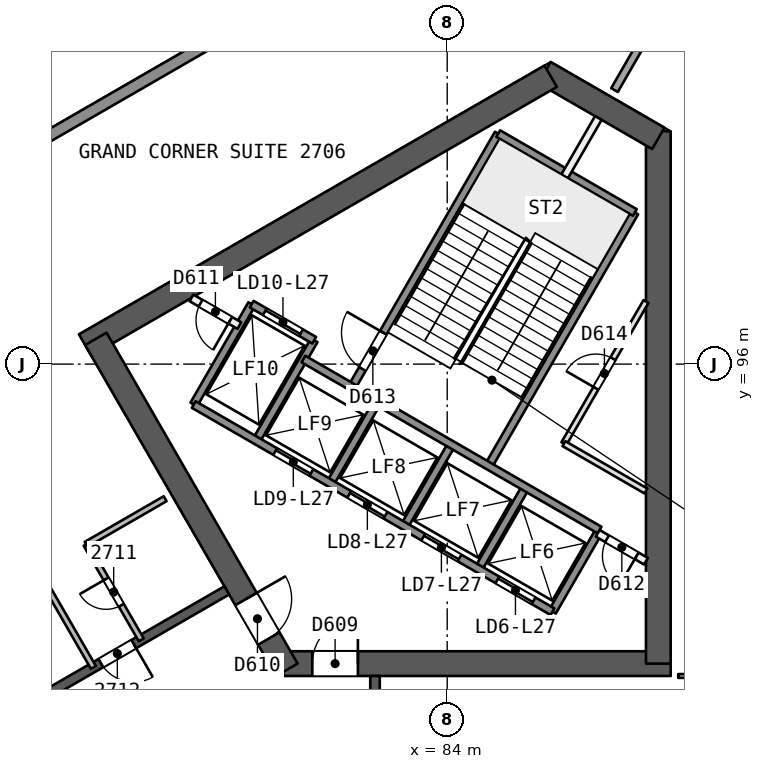
"""IFC4 building model, lengths in metres.
Left out: names, types, materials, properties, quantities, classifications, styles, units other than length and angle.
Written with IfcOpenShell. Run it as: python <this file> out.ifc"""

import sys

from ifc_helpers import new_model, si_unit, direction, frame, frame_2d, origin, place, context, subcontext, project, spatial, rectangle, extrude, element, fill, save


model = new_model("IFC4")
c1 = context("Model", 3, precision=1e-05, world=origin(), true_north=direction((0.0, 1.0)))
c2 = subcontext(c1, "Body", "Model", "MODEL_VIEW")
j1 = project(units=[si_unit("LENGTHUNIT", "METRE"), si_unit("PLANEANGLEUNIT", "RADIAN")], contexts=[c1])
p1 = place(None, origin())
s1 = spatial("IfcSite", under=j1, at=p1, CompositionType="ELEMENT")
p2 = place(p1, origin())
s2 = spatial("IfcBuilding", under=s1, at=p2, CompositionType="ELEMENT")
p3 = place(p2, frame((0.0, 0.0, 114.2)))
s3 = spatial("IfcBuildingStorey", under=s2, at=p3, CompositionType="ELEMENT", Elevation=114.2)
p4 = place(p3, frame((79.688, 88.119, 0.0), z_axis=(0.0, 0.0, 1.0), x_axis=(1.0, 0.0, 0.0)))
e1 = element("IfcWall", 1, at=p4, inside=s3, PredefinedType="SHEAR", context=c2, shape_type="SweptSolid", body=[
    extrude(rectangle(XDim=10.192, YDim=0.65, at=frame_2d((5.096, 0.0))), origin(), (0.0, 0.0, 1.0), 3.7),
])
p5 = place(p4, frame((0.762, 0.0, 0.0)))
e2 = element("IfcOpeningElement", 2, at=p5, cuts=e1, PredefinedType="OPENING", context=c2, shape_type="SweptSolid", body=[
    extrude(rectangle(XDim=1.2, YDim=2.1, at=frame_2d((0.6, 1.05))), frame((0.0, 0.335, 0.0), z_axis=(0.0, -1.0, 0.0), x_axis=(1.0, 0.0, 0.0)), (0.0, 0.0, 1.0), 0.671),
])
p6 = place(p3, frame((89.555, 88.119, 0.0), z_axis=(0.0, 0.0, 1.0), x_axis=(0.0, 1.0, 0.0)))
e3 = element("IfcWall", 3, at=p6, inside=s3, PredefinedType="SHEAR", context=c2, shape_type="SweptSolid", body=[
    extrude(rectangle(XDim=14.009, YDim=0.65, at=frame_2d((7.004, 0.0))), origin(), (0.0, 0.0, 1.0), 3.7),
])
p7 = place(p3, frame((89.555, 101.94, 0.0), z_axis=(0.0, 0.0, 1.0), x_axis=(-0.866031550877, 0.499989352773, 0.0)))
e4 = element("IfcWall", 4, at=p7, inside=s3, PredefinedType="SHEAR", context=c2, shape_type="SweptSolid", body=[
    extrude(rectangle(XDim=3.458, YDim=0.65, at=frame_2d((1.729, 0.0))), origin(), (0.0, 0.0, 1.0), 3.7),
])
p8 = place(p3, frame((86.723, 103.575, 0.0), z_axis=(0.0, 0.0, 1.0), x_axis=(-0.866031824457, -0.499988878904, 0.0)))
e5 = element("IfcWall", 5, at=p8, inside=s3, PredefinedType="SHEAR", context=c2, shape_type="SweptSolid", body=[
    extrude(rectangle(XDim=14.146, YDim=0.65, at=frame_2d((7.073, 0.0))), origin(), (0.0, 0.0, 1.0), 3.7),
])
p9 = place(p3, frame((74.754, 96.665, 0.0), z_axis=(0.0, 0.0, 1.0), x_axis=(0.500011799426, -0.866018591275, 0.0)))
e6 = element("IfcWall", 6, at=p9, inside=s3, PredefinedType="SHEAR", context=c2, shape_type="SweptSolid", body=[
    extrude(rectangle(XDim=10.055, YDim=0.65, at=frame_2d((5.027, 0.0))), origin(), (0.0, 0.0, 1.0), 3.7),
])
p10 = place(p9, frame((7.905, 0.0, 0.0)))
e7 = element("IfcOpeningElement", 7, at=p10, cuts=e6, PredefinedType="OPENING", context=c2, shape_type="SweptSolid", body=[
    extrude(rectangle(XDim=1.2, YDim=2.1, at=frame_2d((0.6, 1.05))), frame((0.0, 0.335, 0.0), z_axis=(0.0, -1.0, 0.0), x_axis=(1.0, 0.0, 0.0)), (0.0, 0.0, 1.0), 0.671),
])
p11 = place(p3, frame((82.1, 72.206, 0.0), z_axis=(0.0, 0.0, 1.0), x_axis=(0.0, 1.0, 0.0)))
e8 = element("IfcWall", 8, at=p11, inside=s3, PredefinedType="SHEAR", context=c2, shape_type="SweptSolid", body=[
    extrude(rectangle(XDim=15.588, YDim=0.25, at=frame_2d((7.794, 0.0))), origin(), (0.0, 0.0, 1.0), 3.25),
])
p12 = place(p11, frame((1.994, 0.0, 0.0)))
e9 = element("IfcOpeningElement", 9, at=p12, cuts=e8, PredefinedType="OPENING", context=c2, shape_type="SweptSolid", body=[
    extrude(rectangle(XDim=1.0, YDim=2.1, at=frame_2d((0.5, 1.05))), frame((0.0, 0.135, 0.0), z_axis=(0.0, -1.0, 0.0), x_axis=(1.0, 0.0, 0.0)), (0.0, 0.0, 1.0), 0.271),
])
p13 = place(p11, frame((8.85, 0.0, 0.0)))
e10 = element("IfcOpeningElement", 10, at=p13, cuts=e8, PredefinedType="OPENING", context=c2, shape_type="SweptSolid", body=[
    extrude(rectangle(XDim=1.1, YDim=2.1, at=frame_2d((0.55, 1.05))), frame((0.0, 0.135, 0.0), z_axis=(0.0, -1.0, 0.0), x_axis=(1.0, 0.0, 0.0)), (0.0, 0.0, 1.0), 0.271),
])
p14 = place(p11, frame((12.75, 0.0, 0.0)))
e11 = element("IfcOpeningElement", 11, at=p14, cuts=e8, PredefinedType="OPENING", context=c2, shape_type="SweptSolid", body=[
    extrude(rectangle(XDim=1.0, YDim=2.1, at=frame_2d((0.5, 1.05))), frame((0.0, 0.135, 0.0), z_axis=(0.0, -1.0, 0.0), x_axis=(1.0, 0.0, 0.0)), (0.0, 0.0, 1.0), 0.271),
])
p15 = place(p3, frame((78.2, 90.046, 0.0), z_axis=(0.0, 0.0, 1.0), x_axis=(-0.866026492143, -0.499998114903, 0.0)))
e12 = element("IfcWall", 12, at=p15, inside=s3, PredefinedType="SHEAR", context=c2, shape_type="SweptSolid", body=[
    extrude(rectangle(XDim=15.588, YDim=0.25, at=frame_2d((7.794, 0.0))), origin(), (0.0, 0.0, 1.0), 3.25),
])
p16 = place(p15, frame((2.826, 0.0, 0.0)))
e13 = element("IfcOpeningElement", 13, at=p16, cuts=e12, PredefinedType="OPENING", context=c2, shape_type="SweptSolid", body=[
    extrude(rectangle(XDim=1.0, YDim=2.1, at=frame_2d((0.5, 1.05))), frame((0.0, 0.135, 0.0), z_axis=(0.0, -1.0, 0.0), x_axis=(1.0, 0.0, 0.0)), (0.0, 0.0, 1.0), 0.271),
])
p17 = place(p15, frame((8.071, 0.0, 0.0)))
e14 = element("IfcOpeningElement", 14, at=p17, cuts=e12, PredefinedType="OPENING", context=c2, shape_type="SweptSolid", body=[
    extrude(rectangle(XDim=1.1, YDim=2.1, at=frame_2d((0.55, 1.05))), frame((0.0, 0.135, 0.0), z_axis=(0.0, -1.0, 0.0), x_axis=(1.0, 0.0, 0.0)), (0.0, 0.0, 1.0), 0.271),
])
p18 = place(p15, frame((11.138, 0.0, 0.0)))
e15 = element("IfcOpeningElement", 15, at=p18, cuts=e12, PredefinedType="OPENING", context=c2, shape_type="SweptSolid", body=[
    extrude(rectangle(XDim=1.0, YDim=2.1, at=frame_2d((0.5, 1.05))), frame((0.0, 0.135, 0.0), z_axis=(0.0, -1.0, 0.0), x_axis=(1.0, 0.0, 0.0)), (0.0, 0.0, 1.0), 0.271),
])
p19 = place(p3, frame((94.651, 87.794, 0.0), z_axis=(0.0, 0.0, 1.0), x_axis=(-1.0, 0.0, 0.0)))
e16 = element("IfcWall", 16, at=p19, inside=s3, PredefinedType="PARTITIONING", context=c2, shape_type="SweptSolid", body=[
    extrude(rectangle(XDim=4.572, YDim=0.1, at=frame_2d((2.286, 0.0))), origin(), (0.0, 0.0, 1.0), 3.25),
])
p20 = place(p19, frame((1.836, 0.0, 0.0)))
e17 = element("IfcOpeningElement", 17, at=p20, cuts=e16, PredefinedType="OPENING", context=c2, shape_type="SweptSolid", body=[
    extrude(rectangle(XDim=0.9, YDim=2.1, at=frame_2d((0.45, 1.05))), frame((0.0, 0.061, 0.0), z_axis=(0.0, -1.0, 0.0), x_axis=(1.0, 0.0, 0.0)), (0.0, 0.0, 1.0), 0.121),
])
p21 = place(p3, frame((92.204, 109.796, 0.0), z_axis=(0.0, 0.0, 1.0), x_axis=(-0.500017062213, -0.866015552687, 0.0)))
e18 = element("IfcWall", 18, at=p21, inside=s3, PredefinedType="PARTITIONING", context=c2, shape_type="SweptSolid", body=[
    extrude(rectangle(XDim=7.604, YDim=0.2, at=frame_2d((3.802, 0.0))), origin(), (0.0, 0.0, 1.0), 3.25),
])
p22 = place(p3, frame((75.948, 88.746, 0.0), z_axis=(0.0, 0.0, 1.0), x_axis=(-0.499987231761, 0.866032775405, 0.0)))
e19 = element("IfcWall", 19, at=p22, inside=s3, PredefinedType="PARTITIONING", context=c2, shape_type="SweptSolid", body=[
    extrude(rectangle(XDim=2.9, YDim=0.15, at=frame_2d((1.45, 0.0))), origin(), (0.0, 0.0, 1.0), 3.25),
])
p23 = place(p22, frame((1.05, 0.0, 0.0)))
e20 = element("IfcOpeningElement", 20, at=p23, cuts=e19, PredefinedType="OPENING", context=c2, shape_type="SweptSolid", body=[
    extrude(rectangle(XDim=0.8, YDim=2.1, at=frame_2d((0.4, 1.05))), frame((0.0, 0.085, 0.0), z_axis=(0.0, -1.0, 0.0), x_axis=(1.0, 0.0, 0.0)), (0.0, 0.0, 1.0), 0.171),
])
p24 = place(p3, frame((74.498, 91.257, 0.0), z_axis=(0.0, 0.0, 1.0), x_axis=(0.866038271014, 0.499977712642, 0.0)))
e21 = element("IfcWall", 21, at=p24, inside=s3, PredefinedType="PARTITIONING", context=c2, shape_type="SweptSolid", body=[
    extrude(rectangle(XDim=2.401, YDim=0.15, at=frame_2d((1.2, 0.0))), origin(), (0.0, 0.0, 1.0), 3.25),
])
p25 = place(p3, frame((73.19, 90.617, 0.0), z_axis=(0.0, 0.0, 1.0), x_axis=(0.499990139034, -0.866031096941, 0.0)))
e22 = element("IfcWall", 22, at=p25, inside=s3, PredefinedType="PARTITIONING", context=c2, shape_type="SweptSolid", body=[
    extrude(rectangle(XDim=3.0, YDim=0.15, at=frame_2d((1.5, 0.0))), origin(), (0.0, 0.0, 1.0), 3.25),
])
p26 = place(p3, frame((40.445, 82.913, 0.0), z_axis=(0.0, 0.0, 1.0), x_axis=(0.866025424614, 0.499999963922, 0.0)))
e23 = element("IfcWall", 23, at=p26, inside=s3, PredefinedType="SOLIDWALL", context=c2, shape_type="SweptSolid", body=[
    extrude(rectangle(XDim=56.938, YDim=0.3, at=frame_2d((28.469, 0.0))), origin(), (0.0, 0.0, 1.0), 3.25),
])
p27 = place(p26, frame((27.892, 0.0, 0.0)))
e24 = element("IfcOpeningElement", 24, at=p27, cuts=e23, PredefinedType="OPENING", context=c2, shape_type="SweptSolid", body=[
    extrude(rectangle(XDim=2.4, YDim=2.4, at=frame_2d((1.2, 1.2))), frame((0.0, 0.161, 0.0), z_axis=(0.0, -1.0, 0.0), x_axis=(1.0, 0.0, 0.0)), (0.0, 0.0, 1.0), 0.321),
])
p28 = place(p26, frame((43.417, 0.0, 0.0)))
e25 = element("IfcOpeningElement", 25, at=p28, cuts=e23, PredefinedType="OPENING", context=c2, shape_type="SweptSolid", body=[
    extrude(rectangle(XDim=2.4, YDim=2.4, at=frame_2d((1.2, 1.2))), frame((0.0, 0.161, 0.0), z_axis=(0.0, -1.0, 0.0), x_axis=(1.0, 0.0, 0.0)), (0.0, 0.0, 1.0), 0.321),
])
p29 = place(p26, frame((11.744, 0.0, 0.0)))
e26 = element("IfcOpeningElement", 26, at=p29, cuts=e23, PredefinedType="OPENING", context=c2, shape_type="SweptSolid", body=[
    extrude(rectangle(XDim=2.4, YDim=2.4, at=frame_2d((1.2, 1.2))), frame((0.0, 0.161, 0.0), z_axis=(0.0, -1.0, 0.0), x_axis=(1.0, 0.0, 0.0)), (0.0, 0.0, 1.0), 0.321),
])
p30 = place(p3, frame((86.77, 89.486, 0.0), z_axis=(0.0, 0.0, 1.0), x_axis=(0.499961042966, 0.86604789447, 0.0)))
e27 = element("IfcWall", 27, at=p30, inside=s3, PredefinedType="SOLIDWALL", context=c2, shape_type="SweptSolid", body=[
    extrude(rectangle(XDim=2.48, YDim=0.2, at=frame_2d((1.24, 0.0))), origin(), (0.0, 0.0, 1.0), 3.25),
])
p31 = place(p3, frame((87.071, 93.908, 0.0), z_axis=(0.0, 0.0, 1.0), x_axis=(0.500012861172, 0.866017978256, 0.0)))
e28 = element("IfcWall", 28, at=p31, inside=s3, PredefinedType="PARTITIONING", context=c2, shape_type="SweptSolid", body=[
    extrude(rectangle(XDim=4.318, YDim=0.15, at=frame_2d((2.159, 0.0))), origin(), (0.0, 0.0, 1.0), 3.25),
])
p32 = place(p31, frame((1.681, 0.0, 0.0)))
e29 = element("IfcOpeningElement", 29, at=p32, cuts=e28, PredefinedType="OPENING", context=c2, shape_type="SweptSolid", body=[
    extrude(rectangle(XDim=0.9, YDim=2.1, at=frame_2d((0.45, 1.05))), frame((0.0, 0.085, 0.0), z_axis=(0.0, -1.0, 0.0), x_axis=(1.0, 0.0, 0.0)), (0.0, 0.0, 1.0), 0.171),
])
p33 = place(p3, frame((84.821, 90.611, 0.0), z_axis=(0.0, 0.0, 1.0), x_axis=(0.499961042966, 0.86604789447, 0.0)))
e30 = element("IfcWall", 30, at=p33, inside=s3, PredefinedType="SOLIDWALL", context=c2, shape_type="SweptSolid", body=[
    extrude(rectangle(XDim=2.48, YDim=0.2, at=frame_2d((1.24, 0.0))), origin(), (0.0, 0.0, 1.0), 3.25),
])
p34 = place(p3, frame((85.087, 93.321, 0.0), z_axis=(0.0, 0.0, 1.0), x_axis=(0.500019787375, 0.866013979237, 0.0)))
e31 = element("IfcWall", 31, at=p34, inside=s3, PredefinedType="SOLIDWALL", context=c2, shape_type="SweptSolid", body=[
    extrude(rectangle(XDim=7.7, YDim=0.2, at=frame_2d((3.85, 0.0))), origin(), (0.0, 0.0, 1.0), 3.25),
])
p35 = place(p3, frame((82.873, 91.736, 0.0), z_axis=(0.0, 0.0, 1.0), x_axis=(0.499961042966, 0.86604789447, 0.0)))
e32 = element("IfcWall", 32, at=p35, inside=s3, PredefinedType="SOLIDWALL", context=c2, shape_type="SweptSolid", body=[
    extrude(rectangle(XDim=2.48, YDim=0.2, at=frame_2d((1.24, 0.0))), origin(), (0.0, 0.0, 1.0), 3.25),
])
p36 = place(p3, frame((87.09, 100.94, 0.0), z_axis=(0.0, 0.0, 1.0), x_axis=(0.499944938281, 0.866057191349, 0.0)))
e33 = element("IfcWall", 33, at=p36, inside=s3, PredefinedType="PARTITIONING", context=c2, shape_type="SweptSolid", body=[
    extrude(rectangle(XDim=1.773, YDim=0.2, at=frame_2d((0.887, 0.0))), origin(), (0.0, 0.0, 1.0), 3.25),
])
p37 = place(p3, frame((80.924, 92.861, 0.0), z_axis=(0.0, 0.0, 1.0), x_axis=(0.499961042966, 0.86604789447, 0.0)))
e34 = element("IfcWall", 34, at=p37, inside=s3, PredefinedType="SOLIDWALL", context=c2, shape_type="SweptSolid", body=[
    extrude(rectangle(XDim=2.48, YDim=0.2, at=frame_2d((1.24, 0.0))), origin(), (0.0, 0.0, 1.0), 3.25),
])
p38 = place(p3, frame((81.493, 95.396, 0.0), z_axis=(0.0, 0.0, 1.0), x_axis=(0.500006057782, 0.866021906294, 0.0)))
e35 = element("IfcWall", 35, at=p38, inside=s3, PredefinedType="SOLIDWALL", context=c2, shape_type="SweptSolid", body=[
    extrude(rectangle(XDim=7.7, YDim=0.2, at=frame_2d((3.85, 0.0))), origin(), (0.0, 0.0, 1.0), 3.25),
])
p39 = place(p38, frame((0.55, 0.0, 0.0)))
e36 = element("IfcOpeningElement", 36, at=p39, cuts=e35, PredefinedType="OPENING", context=c2, shape_type="SweptSolid", body=[
    extrude(rectangle(XDim=1.1, YDim=2.1, at=frame_2d((0.55, 1.05))), frame((0.0, 0.11, 0.0), z_axis=(0.0, -1.0, 0.0), x_axis=(1.0, 0.0, 0.0)), (0.0, 0.0, 1.0), 0.221),
])
for number, where, z_axis, x_axis in (
    (37, (78.976, 93.986, 0.0), (0.0, 0.0, 1.0), (0.5, 0.866, 0.0)),
    (38, (77.33, 94.936, 0.0), (0.0, 0.0, 1.0), (0.5, 0.866, 0.0)),
):
    element("IfcWall", number, at=place(p3, frame(where, z_axis=z_axis, x_axis=x_axis)), inside=s3, PredefinedType="SOLIDWALL", context=c2, shape_type="SweptSolid", body=[
        extrude(rectangle(XDim=3.05, YDim=0.2, at=frame_2d((1.525, 0.0))), origin(), (0.0, 0.0, 1.0), 3.25),
    ])
p40 = place(p3, frame((86.77, 89.486, 0.0), z_axis=(0.0, 0.0, 1.0), x_axis=(-0.86601811187, 0.500012629753, 0.0)))
e39 = element("IfcWall", 39, at=p40, inside=s3, PredefinedType="SOLIDWALL", context=c2, shape_type="SweptSolid", body=[
    extrude(rectangle(XDim=10.9, YDim=0.2, at=frame_2d((5.45, 0.0))), origin(), (0.0, 0.0, 1.0), 3.25),
])
p41 = place(p40, frame((0.575, 0.0, 0.0)))
e40 = element("IfcOpeningElement", 40, at=p41, cuts=e39, PredefinedType="OPENING", context=c2, shape_type="SweptSolid", body=[
    extrude(rectangle(XDim=1.1, YDim=2.1, at=frame_2d((0.55, 1.05))), frame((0.0, 0.11, 0.0), z_axis=(0.0, -1.0, 0.0), x_axis=(1.0, 0.0, 0.0)), (0.0, 0.0, 1.0), 0.221),
])
p42 = place(p40, frame((2.825, 0.0, 0.0)))
e41 = element("IfcOpeningElement", 41, at=p42, cuts=e39, PredefinedType="OPENING", context=c2, shape_type="SweptSolid", body=[
    extrude(rectangle(XDim=1.1, YDim=2.1, at=frame_2d((0.55, 1.05))), frame((0.0, 0.11, 0.0), z_axis=(0.0, -1.0, 0.0), x_axis=(1.0, 0.0, 0.0)), (0.0, 0.0, 1.0), 0.221),
])
p43 = place(p40, frame((5.075, 0.0, 0.0)))
e42 = element("IfcOpeningElement", 42, at=p43, cuts=e39, PredefinedType="OPENING", context=c2, shape_type="SweptSolid", body=[
    extrude(rectangle(XDim=1.1, YDim=2.1, at=frame_2d((0.55, 1.05))), frame((0.0, 0.11, 0.0), z_axis=(0.0, -1.0, 0.0), x_axis=(1.0, 0.0, 0.0)), (0.0, 0.0, 1.0), 0.221),
])
p44 = place(p40, frame((7.325, 0.0, 0.0)))
e43 = element("IfcOpeningElement", 43, at=p44, cuts=e39, PredefinedType="OPENING", context=c2, shape_type="SweptSolid", body=[
    extrude(rectangle(XDim=1.1, YDim=2.1, at=frame_2d((0.55, 1.05))), frame((0.0, 0.11, 0.0), z_axis=(0.0, -1.0, 0.0), x_axis=(1.0, 0.0, 0.0)), (0.0, 0.0, 1.0), 0.221),
])
p45 = place(p3, frame((89.23, 90.814, 0.0), z_axis=(0.0, 0.0, 1.0), x_axis=(-0.866022048785, 0.500005810984, 0.0)))
e44 = element("IfcWall", 44, at=p45, inside=s3, PredefinedType="PARTITIONING", context=c2, shape_type="SweptSolid", body=[
    extrude(rectangle(XDim=1.467, YDim=0.2, at=frame_2d((0.733, 0.0))), origin(), (0.0, 0.0, 1.0), 3.25),
])
p46 = place(p45, frame((0.283, 0.0, 0.0)))
e45 = element("IfcOpeningElement", 45, at=p46, cuts=e44, PredefinedType="OPENING", context=c2, shape_type="SweptSolid", body=[
    extrude(rectangle(XDim=0.9, YDim=2.1, at=frame_2d((0.45, 1.05))), frame((0.0, 0.11, 0.0), z_axis=(0.0, -1.0, 0.0), x_axis=(1.0, 0.0, 0.0)), (0.0, 0.0, 1.0), 0.221),
])
p47 = place(p3, frame((78.53, 97.014, 0.0), z_axis=(0.0, 0.0, 1.0), x_axis=(-0.866045896294, 0.499964504253, 0.0)))
e46 = element("IfcWall", 46, at=p47, inside=s3, PredefinedType="PARTITIONING", context=c2, shape_type="SweptSolid", body=[
    extrude(rectangle(XDim=1.455, YDim=0.2, at=frame_2d((0.728, 0.0))), origin(), (0.0, 0.0, 1.0), 3.25),
])
p48 = place(p47, frame((0.278, 0.0, 0.0)))
e47 = element("IfcOpeningElement", 47, at=p48, cuts=e46, PredefinedType="OPENING", context=c2, shape_type="SweptSolid", body=[
    extrude(rectangle(XDim=0.9, YDim=2.1, at=frame_2d((0.45, 1.05))), frame((0.0, 0.11, 0.0), z_axis=(0.0, -1.0, 0.0), x_axis=(1.0, 0.0, 0.0)), (0.0, 0.0, 1.0), 0.221),
])
p49 = place(p3, frame((88.01, 91.634, 0.0), z_axis=(0.0, 0.0, 1.0), x_axis=(-0.866024315419, 0.5000018851, 0.0)))
e48 = element("IfcWall", 48, at=p49, inside=s3, PredefinedType="SOLIDWALL", context=c2, shape_type="SweptSolid", body=[
    extrude(rectangle(XDim=9.0, YDim=0.2, at=frame_2d((4.5, 0.0))), origin(), (0.0, 0.0, 1.0), 3.25),
])
p50 = place(p3, frame((80.5, 96.627, 0.0), z_axis=(0.0, 0.0, 1.0), x_axis=(-0.86601224135, 0.500022797313, 0.0)))
e49 = element("IfcWall", 49, at=p50, inside=s3, PredefinedType="SOLIDWALL", context=c2, shape_type="SweptSolid", body=[
    extrude(rectangle(XDim=1.9, YDim=0.2, at=frame_2d((0.95, 0.0))), origin(), (0.0, 0.0, 1.0), 3.25),
])
p51 = place(p50, frame((0.4, 0.0, 0.0)))
e50 = element("IfcOpeningElement", 50, at=p51, cuts=e49, PredefinedType="OPENING", context=c2, shape_type="SweptSolid", body=[
    extrude(rectangle(XDim=1.1, YDim=2.1, at=frame_2d((0.55, 1.05))), frame((0.0, 0.11, 0.0), z_axis=(0.0, -1.0, 0.0), x_axis=(1.0, 0.0, 0.0)), (0.0, 0.0, 1.0), 0.221),
])
p52 = place(p3, frame((89.23, 92.661, 0.0), z_axis=(0.0, 0.0, 1.0), x_axis=(-0.866046964233, 0.499962654349, 0.0)))
e51 = element("IfcWall", 51, at=p52, inside=s3, PredefinedType="PARTITIONING", context=c2, shape_type="SweptSolid", body=[
    extrude(rectangle(XDim=2.493, YDim=0.15, at=frame_2d((1.247, 0.0))), origin(), (0.0, 0.0, 1.0), 3.25),
])
p53 = place(p3, frame((88.937, 99.99, 0.0), z_axis=(0.0, 0.0, 1.0), x_axis=(-0.866004344652, 0.500036473714, 0.0)))
e52 = element("IfcWall", 52, at=p53, inside=s3, PredefinedType="SOLIDWALL", context=c2, shape_type="SweptSolid", body=[
    extrude(rectangle(XDim=4.15, YDim=0.2, at=frame_2d((2.075, 0.0))), origin(), (0.0, 0.0, 1.0), 3.25),
])
p54 = place(p23, origin())
e53 = element("IfcDoor", 53, at=p54, inside=s3, OperationType="SINGLE_SWING_RIGHT", PredefinedType="NOTDEFINED", context=c2, shape_type="SweptSolid", body=[
    extrude(rectangle(XDim=0.8, YDim=2.1, at=frame_2d((0.4, 1.05))), frame((0.0, 0.025, 0.0), z_axis=(0.0, -1.0, 0.0), x_axis=(1.0, 0.0, 0.0)), (0.0, 0.0, 1.0), 0.05),
])
fill(e20, e53)
p55 = place(p16, origin())
e54 = element("IfcDoor", 54, at=p55, inside=s3, OperationType="SINGLE_SWING_LEFT", PredefinedType="NOTDEFINED", context=c2, shape_type="SweptSolid", body=[
    extrude(rectangle(XDim=1.0, YDim=2.1, at=frame_2d((0.5, 1.05))), frame((0.0, 0.025, 0.0), z_axis=(0.0, -1.0, 0.0), x_axis=(1.0, 0.0, 0.0)), (0.0, 0.0, 1.0), 0.05),
])
fill(e13, e54)
p56 = place(p5, origin())
e55 = element("IfcDoor", 55, at=p56, inside=s3, OperationType="SINGLE_SWING_RIGHT", PredefinedType="NOTDEFINED", context=c2, shape_type="SweptSolid", body=[
    extrude(rectangle(XDim=1.2, YDim=2.1, at=frame_2d((0.6, 1.05))), frame((0.0, 0.025, 0.0), z_axis=(0.0, -1.0, 0.0), x_axis=(1.0, 0.0, 0.0)), (0.0, 0.0, 1.0), 0.05),
])
fill(e2, e55)
p57 = place(p10, origin())
e56 = element("IfcDoor", 56, at=p57, inside=s3, OperationType="SINGLE_SWING_LEFT", PredefinedType="NOTDEFINED", context=c2, shape_type="SweptSolid", body=[
    extrude(rectangle(XDim=1.2, YDim=2.1, at=frame_2d((0.6, 1.05))), frame((0.0, 0.025, 0.0), z_axis=(0.0, -1.0, 0.0), x_axis=(1.0, 0.0, 0.0)), (0.0, 0.0, 1.0), 0.05),
])
fill(e7, e56)
p58 = place(p41, origin())
e57 = element("IfcDoor", 57, at=p58, inside=s3, OperationType="SLIDING_TO_RIGHT", PredefinedType="NOTDEFINED", context=c2, shape_type="SweptSolid", body=[
    extrude(rectangle(XDim=1.1, YDim=2.1, at=frame_2d((0.55, 1.05))), frame((0.0, 0.025, 0.0), z_axis=(0.0, -1.0, 0.0), x_axis=(1.0, 0.0, 0.0)), (0.0, 0.0, 1.0), 0.05),
])
fill(e40, e57)
p59 = place(p42, origin())
e58 = element("IfcDoor", 58, at=p59, inside=s3, OperationType="SLIDING_TO_LEFT", PredefinedType="NOTDEFINED", context=c2, shape_type="SweptSolid", body=[
    extrude(rectangle(XDim=1.1, YDim=2.1, at=frame_2d((0.55, 1.05))), frame((0.0, 0.025, 0.0), z_axis=(0.0, -1.0, 0.0), x_axis=(1.0, 0.0, 0.0)), (0.0, 0.0, 1.0), 0.05),
])
fill(e41, e58)
p60 = place(p43, origin())
e59 = element("IfcDoor", 59, at=p60, inside=s3, OperationType="SLIDING_TO_RIGHT", PredefinedType="NOTDEFINED", context=c2, shape_type="SweptSolid", body=[
    extrude(rectangle(XDim=1.1, YDim=2.1, at=frame_2d((0.55, 1.05))), frame((0.0, 0.025, 0.0), z_axis=(0.0, -1.0, 0.0), x_axis=(1.0, 0.0, 0.0)), (0.0, 0.0, 1.0), 0.05),
])
fill(e42, e59)
p61 = place(p44, origin())
e60 = element("IfcDoor", 60, at=p61, inside=s3, OperationType="SLIDING_TO_LEFT", PredefinedType="NOTDEFINED", context=c2, shape_type="SweptSolid", body=[
    extrude(rectangle(XDim=1.1, YDim=2.1, at=frame_2d((0.55, 1.05))), frame((0.0, 0.025, 0.0), z_axis=(0.0, -1.0, 0.0), x_axis=(1.0, 0.0, 0.0)), (0.0, 0.0, 1.0), 0.05),
])
fill(e43, e60)
p62 = place(p51, origin())
e61 = element("IfcDoor", 61, at=p62, inside=s3, OperationType="SLIDING_TO_RIGHT", PredefinedType="NOTDEFINED", context=c2, shape_type="SweptSolid", body=[
    extrude(rectangle(XDim=1.1, YDim=2.1, at=frame_2d((0.55, 1.05))), frame((0.0, 0.025, 0.0), z_axis=(0.0, -1.0, 0.0), x_axis=(1.0, 0.0, 0.0)), (0.0, 0.0, 1.0), 0.05),
])
fill(e50, e61)
p63 = place(p48, origin())
e62 = element("IfcDoor", 62, at=p63, inside=s3, OperationType="SINGLE_SWING_LEFT", PredefinedType="NOTDEFINED", context=c2, shape_type="SweptSolid", body=[
    extrude(rectangle(XDim=0.9, YDim=2.1, at=frame_2d((0.45, 1.05))), frame((0.0, 0.025, 0.0), z_axis=(0.0, -1.0, 0.0), x_axis=(1.0, 0.0, 0.0)), (0.0, 0.0, 1.0), 0.05),
])
fill(e47, e62)
p64 = place(p46, origin())
e63 = element("IfcDoor", 63, at=p64, inside=s3, OperationType="SINGLE_SWING_LEFT", PredefinedType="NOTDEFINED", context=c2, shape_type="SweptSolid", body=[
    extrude(rectangle(XDim=0.9, YDim=2.1, at=frame_2d((0.45, 1.05))), frame((0.0, 0.025, 0.0), z_axis=(0.0, -1.0, 0.0), x_axis=(1.0, 0.0, 0.0)), (0.0, 0.0, 1.0), 0.05),
])
fill(e45, e63)
p65 = place(p39, origin())
e64 = element("IfcDoor", 64, at=p65, inside=s3, OperationType="SINGLE_SWING_RIGHT", PredefinedType="NOTDEFINED", context=c2, shape_type="SweptSolid", body=[
    extrude(rectangle(XDim=1.1, YDim=2.1, at=frame_2d((0.55, 1.05))), frame((0.0, 0.025, 0.0), z_axis=(0.0, -1.0, 0.0), x_axis=(1.0, 0.0, 0.0)), (0.0, 0.0, 1.0), 0.05),
])
fill(e36, e64)
p66 = place(p32, origin())
e65 = element("IfcDoor", 65, at=p66, inside=s3, OperationType="SINGLE_SWING_LEFT", PredefinedType="NOTDEFINED", context=c2, shape_type="SweptSolid", body=[
    extrude(rectangle(XDim=0.9, YDim=2.1, at=frame_2d((0.45, 1.05))), frame((0.0, 0.025, 0.0), z_axis=(0.0, -1.0, 0.0), x_axis=(1.0, 0.0, 0.0)), (0.0, 0.0, 1.0), 0.05),
])
fill(e29, e65)
save(model, sys.argv[1])
